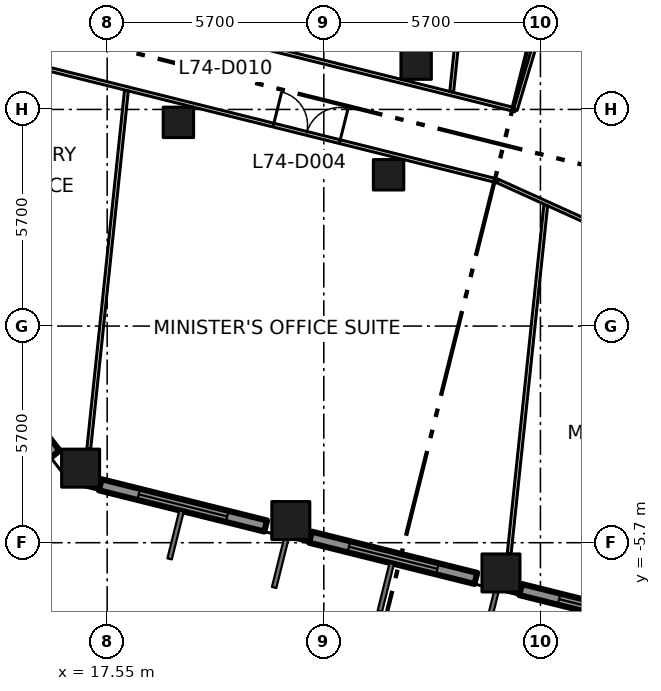
"""IFC4 building model, lengths in metres.
Left out: names, types, materials, properties, quantities, classifications, styles, units other than length and angle.
Written with IfcOpenShell. Run it as: python <this file> out.ifc"""

import sys

from ifc_helpers import new_model, si_unit, direction, frame, frame_2d, origin, origin_2d, place, context, subcontext, project, spatial, rectangle, extrude, element, fill, save


model = new_model("IFC4")
c1 = context("Model", 3, precision=1e-05, world=origin(), true_north=direction((0.0, 1.0)))
c2 = subcontext(c1, "Body", "Model", "MODEL_VIEW")
j1 = project(units=[si_unit("LENGTHUNIT", "METRE"), si_unit("PLANEANGLEUNIT", "RADIAN")], contexts=[c1])
p1 = place(None, origin())
s1 = spatial("IfcSite", under=j1, at=p1, CompositionType="ELEMENT")
p2 = place(p1, origin())
s2 = spatial("IfcBuilding", under=s1, at=p2, CompositionType="ELEMENT")
p3 = place(p2, frame((0.0, 0.0, 323.4)))
s3 = spatial("IfcBuildingStorey", under=s2, at=p3, CompositionType="ELEMENT", Elevation=323.4)
for number, where, z_axis, x_axis in (
    (1, (16.851, -3.738, 0.0), (0.0, 0.0, 1.0), (1.0, 0.0, 0.0)),
    (2, (22.382, -5.117, 0.0), (0.0, 0.0, 1.0), (1.0, 0.0, 0.0)),
    (3, (27.912, -6.496, 0.0), (0.0, 0.0, 1.0), (1.0, 0.0, 0.0)),
):
    element("IfcColumn", number, at=place(p3, frame(where, z_axis=z_axis, x_axis=x_axis)), inside=s3, PredefinedType="COLUMN", context=c2, shape_type="SweptSolid", body=[
        extrude(rectangle(XDim=1.0, YDim=1.0, at=origin_2d()), origin(), (0.0, 0.0, 1.0), 4.2),
    ])
for number, where, z_axis, x_axis in (
    (4, (19.424, 5.36, 0.0), (0.0, 0.0, 1.0), (1.0, 0.0, 0.0)),
    (5, (24.954, 3.981, 0.0), (0.0, 0.0, 1.0), (1.0, 0.0, 0.0)),
    (6, (25.68, 6.892, 0.0), (0.0, 0.0, 1.0), (1.0, 0.0, 0.0)),
):
    element("IfcColumn", number, at=place(p3, frame(where, z_axis=z_axis, x_axis=x_axis)), inside=s3, PredefinedType="COLUMN", context=c2, shape_type="SweptSolid", body=[
        extrude(rectangle(XDim=0.8, YDim=0.8, at=origin_2d()), origin(), (0.0, 0.0, 1.0), 4.2),
    ])
p4 = place(p3, frame((13.538, 0.016, 0.0), z_axis=(0.0, 0.0, 1.0), x_axis=(0.615713519567, -0.787970089421, 0.0)))
e7 = element("IfcWall", 7, at=p4, inside=s3, PredefinedType="SOLIDWALL", context=c2, shape_type="SweptSolid", body=[
    extrude(rectangle(XDim=4.296, YDim=0.3, at=frame_2d((2.148, 0.0))), origin(), (0.0, 0.0, 1.0), 3.2),
])
p5 = place(p4, frame((0.948, 0.0, 0.8)))
e8 = element("IfcOpeningElement", 8, at=p5, cuts=e7, PredefinedType="OPENING", context=c2, shape_type="SweptSolid", body=[
    extrude(rectangle(XDim=2.4, YDim=2.1, at=frame_2d((1.2, 1.05))), frame((0.0, 0.16, 0.0), z_axis=(0.0, -1.0, 0.0), x_axis=(1.0, 0.0, 0.0)), (0.0, 0.0, 1.0), 0.32),
])
p6 = place(p3, frame((17.367, -4.176, 0.0), z_axis=(0.0, 0.0, 1.0), x_axis=(0.970327846266, -0.241793032904, 0.0)))
e9 = element("IfcWall", 9, at=p6, inside=s3, PredefinedType="SOLIDWALL", context=c2, shape_type="SweptSolid", body=[
    extrude(rectangle(XDim=4.487, YDim=0.3, at=frame_2d((2.244, 0.0))), origin(), (0.0, 0.0, 1.0), 3.2),
])
p7 = place(p6, frame((1.044, 0.0, 0.8)))
e10 = element("IfcOpeningElement", 10, at=p7, cuts=e9, PredefinedType="OPENING", context=c2, shape_type="SweptSolid", body=[
    extrude(rectangle(XDim=2.4, YDim=2.1, at=frame_2d((1.2, 1.05))), frame((0.0, 0.16, 0.0), z_axis=(0.0, -1.0, 0.0), x_axis=(1.0, 0.0, 0.0)), (0.0, 0.0, 1.0), 0.32),
])
p8 = place(p3, frame((22.898, -5.555, 0.0), z_axis=(0.0, 0.0, 1.0), x_axis=(0.970315118421, -0.24184410467, 0.0)))
e11 = element("IfcWall", 11, at=p8, inside=s3, PredefinedType="SOLIDWALL", context=c2, shape_type="SweptSolid", body=[
    extrude(rectangle(XDim=4.486, YDim=0.3, at=frame_2d((2.243, 0.0))), origin(), (0.0, 0.0, 1.0), 3.2),
])
p9 = place(p8, frame((1.044, 0.0, 0.8)))
e12 = element("IfcOpeningElement", 12, at=p9, cuts=e11, PredefinedType="OPENING", context=c2, shape_type="SweptSolid", body=[
    extrude(rectangle(XDim=2.4, YDim=2.1, at=frame_2d((1.2, 1.05))), frame((0.0, 0.16, 0.0), z_axis=(0.0, -1.0, 0.0), x_axis=(1.0, 0.0, 0.0)), (0.0, 0.0, 1.0), 0.32),
])
p10 = place(p3, frame((28.428, -6.933, 0.0), z_axis=(0.0, 0.0, 1.0), x_axis=(0.970276766004, -0.241997928406, 0.0)))
e13 = element("IfcWall", 13, at=p10, inside=s3, PredefinedType="SOLIDWALL", context=c2, shape_type="SweptSolid", body=[
    extrude(rectangle(XDim=4.487, YDim=0.3, at=frame_2d((2.244, 0.0))), origin(), (0.0, 0.0, 1.0), 3.2),
])
p11 = place(p10, frame((1.044, 0.0, 0.8)))
e14 = element("IfcOpeningElement", 14, at=p11, cuts=e13, PredefinedType="OPENING", context=c2, shape_type="SweptSolid", body=[
    extrude(rectangle(XDim=2.4, YDim=2.1, at=frame_2d((1.2, 1.05))), frame((0.0, 0.16, 0.0), z_axis=(0.0, -1.0, 0.0), x_axis=(1.0, 0.0, 0.0)), (0.0, 0.0, 1.0), 0.32),
])
p12 = place(p3, frame((8.535, 8.626, 0.0), z_axis=(0.0, 0.0, 1.0), x_axis=(0.970298340477, -0.241911410372, 0.0)))
e15 = element("IfcWall", 15, at=p12, inside=s3, PredefinedType="PARTITIONING", context=c2, shape_type="SweptSolid", body=[
    extrude(rectangle(XDim=19.88, YDim=0.1, at=frame_2d((9.94, 0.0))), origin(), (0.0, 0.0, 1.0), 3.9),
])
p13 = place(p12, frame((13.799, 0.0, 0.0)))
e16 = element("IfcOpeningElement", 16, at=p13, cuts=e15, PredefinedType="OPENING", context=c2, shape_type="SweptSolid", body=[
    extrude(rectangle(XDim=1.8, YDim=2.1, at=frame_2d((0.9, 1.05))), frame((0.0, 0.06, 0.0), z_axis=(0.0, -1.0, 0.0), x_axis=(1.0, 0.0, 0.0)), (0.0, 0.0, 1.0), 0.12),
])
p14 = place(p12, frame((4.38, 0.0, 0.0)))
e17 = element("IfcOpeningElement", 17, at=p14, cuts=e15, PredefinedType="OPENING", context=c2, shape_type="SweptSolid", body=[
    extrude(rectangle(XDim=1.0, YDim=2.1, at=frame_2d((0.5, 1.05))), frame((0.0, 0.06, 0.0), z_axis=(0.0, -1.0, 0.0), x_axis=(1.0, 0.0, 0.0)), (0.0, 0.0, 1.0), 0.12),
])
p15 = place(p3, frame((9.002, 10.499, 0.0), z_axis=(0.0, 0.0, 1.0), x_axis=(0.970298340477, -0.241911410372, 0.0)))
e18 = element("IfcWall", 18, at=p15, inside=s3, PredefinedType="PARTITIONING", context=c2, shape_type="SweptSolid", body=[
    extrude(rectangle(XDim=19.88, YDim=0.1, at=frame_2d((9.94, 0.0))), origin(), (0.0, 0.0, 1.0), 3.9),
])
p16 = place(p15, frame((12.518, 0.0, 0.0)))
e19 = element("IfcOpeningElement", 19, at=p16, cuts=e18, PredefinedType="OPENING", context=c2, shape_type="SweptSolid", body=[
    extrude(rectangle(XDim=1.0, YDim=2.1, at=frame_2d((0.5, 1.05))), frame((0.0, 0.06, 0.0), z_axis=(0.0, -1.0, 0.0), x_axis=(1.0, 0.0, 0.0)), (0.0, 0.0, 1.0), 0.12),
])
p17 = place(p3, frame((27.824, 3.817, 0.0), z_axis=(0.0, 0.0, 1.0), x_axis=(0.910793734201, -0.41286168839, 0.0)))
e20 = element("IfcWall", 20, at=p17, inside=s3, PredefinedType="PARTITIONING", context=c2, shape_type="SweptSolid", body=[
    extrude(rectangle(XDim=2.482, YDim=0.1, at=frame_2d((1.241, 0.0))), origin(), (0.0, 0.0, 1.0), 3.9),
])
p18 = place(p3, frame((30.8, 14.1, 0.0), z_axis=(0.0, 0.0, 1.0), x_axis=(-0.28588265334, -0.958264633867, 0.0)))
e21 = element("IfcWall", 21, at=p18, inside=s3, PredefinedType="PARTITIONING", context=c2, shape_type="SweptSolid", body=[
    extrude(rectangle(XDim=8.776, YDim=0.1, at=frame_2d((4.388, 0.0))), origin(), (0.0, 0.0, 1.0), 3.9),
])
p19 = place(p18, frame((3.68, 0.0, 0.0)))
e22 = element("IfcOpeningElement", 22, at=p19, cuts=e21, PredefinedType="OPENING", context=c2, shape_type="SweptSolid", body=[
    extrude(rectangle(XDim=1.0, YDim=2.1, at=frame_2d((0.5, 1.05))), frame((0.0, 0.06, 0.0), z_axis=(0.0, -1.0, 0.0), x_axis=(1.0, 0.0, 0.0)), (0.0, 0.0, 1.0), 0.12),
])
p20 = place(p3, frame((17.065, -3.238, 0.0), z_axis=(0.0, 0.0, 1.0), x_axis=(0.104487801341, 0.994526168269, 0.0)))
e23 = element("IfcWall", 23, at=p20, inside=s3, PredefinedType="PARTITIONING", context=c2, shape_type="SweptSolid", body=[
    extrude(rectangle(XDim=9.484, YDim=0.1, at=frame_2d((4.742, 0.0))), origin(), (0.0, 0.0, 1.0), 3.9),
])
p21 = place(p3, frame((26.615, 6.166, 0.0), z_axis=(0.0, 0.0, 1.0), x_axis=(0.10453822663, 0.994520869149, 0.0)))
e24 = element("IfcWall", 24, at=p21, inside=s3, PredefinedType="PARTITIONING", context=c2, shape_type="SweptSolid", body=[
    extrude(rectangle(XDim=7.978, YDim=0.1, at=frame_2d((3.989, 0.0))), origin(), (0.0, 0.0, 1.0), 3.9),
])
p22 = place(p3, frame((28.127, -5.996, 0.0), z_axis=(0.0, 0.0, 1.0), x_axis=(0.104490376754, 0.994525897685, 0.0)))
e25 = element("IfcWall", 25, at=p22, inside=s3, PredefinedType="PARTITIONING", context=c2, shape_type="SweptSolid", body=[
    extrude(rectangle(XDim=9.218, YDim=0.1, at=frame_2d((4.609, 0.0))), origin(), (0.0, 0.0, 1.0), 3.9),
])
p23 = place(p7, origin())
e26 = element("IfcWindow", 26, at=p23, inside=s3, PartitioningType="DOUBLE_PANEL_VERTICAL", PredefinedType="WINDOW", context=c2, shape_type="SweptSolid", body=[
    extrude(rectangle(XDim=2.4, YDim=2.1, at=frame_2d((1.2, 1.05))), frame((0.0, 0.03, 0.0), z_axis=(0.0, -1.0, 0.0), x_axis=(1.0, 0.0, 0.0)), (0.0, 0.0, 1.0), 0.06),
])
fill(e10, e26)
p24 = place(p9, origin())
e27 = element("IfcWindow", 27, at=p24, inside=s3, PartitioningType="DOUBLE_PANEL_VERTICAL", PredefinedType="WINDOW", context=c2, shape_type="SweptSolid", body=[
    extrude(rectangle(XDim=2.4, YDim=2.1, at=frame_2d((1.2, 1.05))), frame((0.0, 0.03, 0.0), z_axis=(0.0, -1.0, 0.0), x_axis=(1.0, 0.0, 0.0)), (0.0, 0.0, 1.0), 0.06),
])
fill(e12, e27)
p25 = place(p11, origin())
e28 = element("IfcWindow", 28, at=p25, inside=s3, PartitioningType="DOUBLE_PANEL_VERTICAL", PredefinedType="WINDOW", context=c2, shape_type="SweptSolid", body=[
    extrude(rectangle(XDim=2.4, YDim=2.1, at=frame_2d((1.2, 1.05))), frame((0.0, 0.03, 0.0), z_axis=(0.0, -1.0, 0.0), x_axis=(1.0, 0.0, 0.0)), (0.0, 0.0, 1.0), 0.06),
])
fill(e14, e28)
p26 = place(p13, origin())
e29 = element("IfcDoor", 29, at=p26, inside=s3, OperationType="DOUBLE_DOOR_SINGLE_SWING", PredefinedType="DOOR", context=c2, shape_type="SweptSolid", body=[
    extrude(rectangle(XDim=1.8, YDim=2.1, at=frame_2d((0.9, 1.05))), frame((0.0, 0.025, 0.0), z_axis=(0.0, -1.0, 0.0), x_axis=(1.0, 0.0, 0.0)), (0.0, 0.0, 1.0), 0.05),
])
fill(e16, e29)
save(model, sys.argv[1])
